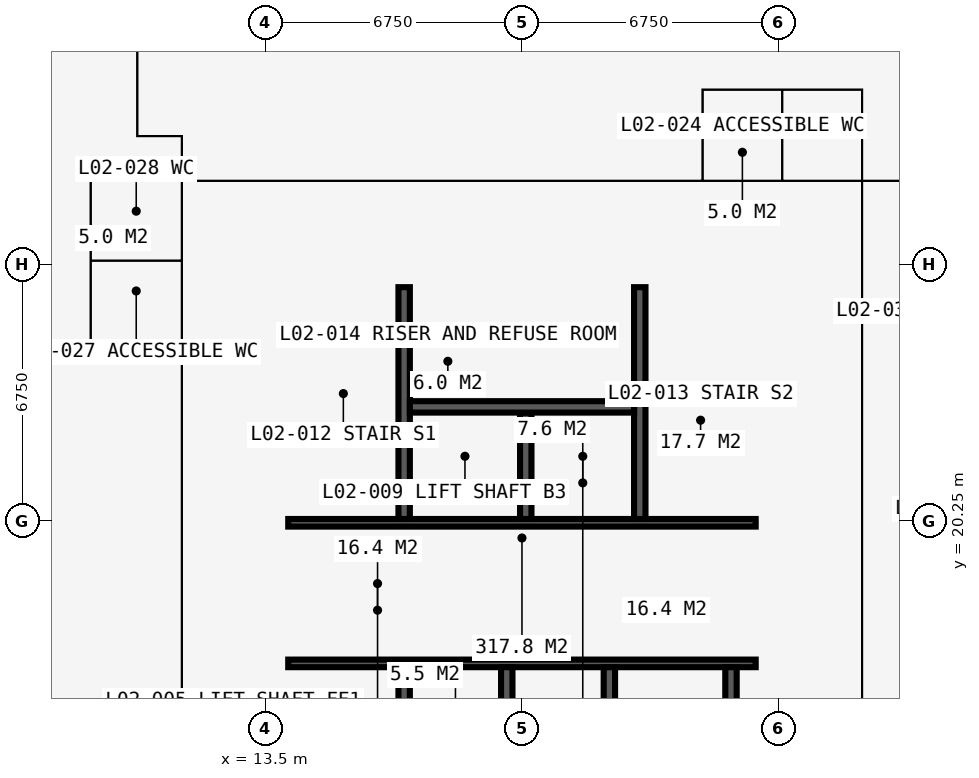
"""IFC4 building model, lengths in metres.
Left out: names, types, materials, properties, quantities, classifications, styles, units other than length and angle.
Written with IfcOpenShell. Run it as: python <this file> out.ifc"""

import sys

from ifc_helpers import new_model, si_unit, direction, frame, frame_2d, origin, place, context, subcontext, project, spatial, rectangle, extrude, element, fill, save


model = new_model("IFC4")
c1 = context("Model", 3, precision=1e-05, world=origin(), true_north=direction((0.0, 1.0)))
c2 = subcontext(c1, "Body", "Model", "MODEL_VIEW")
j1 = project(units=[si_unit("LENGTHUNIT", "METRE"), si_unit("PLANEANGLEUNIT", "RADIAN")], contexts=[c1])
p1 = place(None, origin())
s1 = spatial("IfcSite", under=j1, at=p1, CompositionType="ELEMENT")
p2 = place(p1, origin())
s2 = spatial("IfcBuilding", under=s1, at=p2, CompositionType="ELEMENT")
p3 = place(p2, frame((0.0, 0.0, 9.0)))
s3 = spatial("IfcBuildingStorey", under=s2, at=p3, CompositionType="ELEMENT", Elevation=9.0)
p4 = place(p3, frame((27.0, 14.1, 0.0), z_axis=(0.0, 0.0, 1.0), x_axis=(0.0, 1.0, 0.0)))
e1 = element("IfcWall", 1, at=p4, inside=s3, PredefinedType="SHEAR", context=c2, shape_type="SweptSolid", body=[
    extrude(rectangle(XDim=12.3, YDim=1.2, at=frame_2d((6.15, 0.0))), origin(), (0.0, 0.0, 1.0), 4.5),
])
p5 = place(p4, frame((3.65, 0.0, 0.0)))
e2 = element("IfcOpeningElement", 2, at=p5, cuts=e1, PredefinedType="OPENING", context=c2, shape_type="SweptSolid", body=[
    extrude(rectangle(XDim=1.2, YDim=2.2, at=frame_2d((0.6, 1.1))), frame((0.0, 0.61, 0.0), z_axis=(0.0, -1.0, 0.0), x_axis=(1.0, 0.0, 0.0)), (0.0, 0.0, 1.0), 1.22),
])
p6 = place(p3, frame((27.6, 27.0, 0.0), z_axis=(0.0, 0.0, 1.0), x_axis=(-1.0, 0.0, 0.0)))
e3 = element("IfcWall", 3, at=p6, inside=s3, PredefinedType="SHEAR", context=c2, shape_type="SweptSolid", body=[
    extrude(rectangle(XDim=14.7, YDim=1.2, at=frame_2d((7.35, 0.0))), origin(), (0.0, 0.0, 1.0), 4.5),
])
p7 = place(p6, frame((5.225, 0.0, 0.0)))
e4 = element("IfcOpeningElement", 4, at=p7, cuts=e3, PredefinedType="OPENING", context=c2, shape_type="SweptSolid", body=[
    extrude(rectangle(XDim=0.9, YDim=2.2, at=frame_2d((0.45, 1.1))), frame((0.0, 0.61, 0.0), z_axis=(0.0, -1.0, 0.0), x_axis=(1.0, 0.0, 0.0)), (0.0, 0.0, 1.0), 1.22),
])
p8 = place(p6, frame((8.2, 0.0, 0.0)))
e5 = element("IfcOpeningElement", 5, at=p8, cuts=e3, PredefinedType="OPENING", context=c2, shape_type="SweptSolid", body=[
    extrude(rectangle(XDim=1.0, YDim=2.2, at=frame_2d((0.5, 1.1))), frame((0.0, 0.61, 0.0), z_axis=(0.0, -1.0, 0.0), x_axis=(1.0, 0.0, 0.0)), (0.0, 0.0, 1.0), 1.22),
])
p9 = place(p3, frame((13.5, 26.4, 0.0), z_axis=(0.0, 0.0, 1.0), x_axis=(0.0, -1.0, 0.0)))
e6 = element("IfcWall", 6, at=p9, inside=s3, PredefinedType="SHEAR", context=c2, shape_type="SweptSolid", body=[
    extrude(rectangle(XDim=12.3, YDim=1.2, at=frame_2d((6.15, 0.0))), origin(), (0.0, 0.0, 1.0), 4.5),
])
p10 = place(p9, frame((7.45, 0.0, 0.0)))
e7 = element("IfcOpeningElement", 7, at=p10, cuts=e6, PredefinedType="OPENING", context=c2, shape_type="SweptSolid", body=[
    extrude(rectangle(XDim=1.2, YDim=2.2, at=frame_2d((0.6, 1.1))), frame((0.0, 0.61, 0.0), z_axis=(0.0, -1.0, 0.0), x_axis=(1.0, 0.0, 0.0)), (0.0, 0.0, 1.0), 1.22),
])
p11 = place(p3, frame((14.1, 16.5, 0.0), z_axis=(0.0, 0.0, 1.0), x_axis=(1.0, 0.0, 0.0)))
e8 = element("IfcWall", 8, at=p11, inside=s3, PredefinedType="SHEAR", context=c2, shape_type="SweptSolid", body=[
    extrude(rectangle(XDim=12.3, YDim=0.2, at=frame_2d((6.15, 0.0))), origin(), (0.0, 0.0, 1.0), 4.5),
])
p12 = place(p11, frame((0.9, 0.0, 0.0)))
e9 = element("IfcOpeningElement", 9, at=p12, cuts=e8, PredefinedType="OPENING", context=c2, shape_type="SweptSolid", body=[
    extrude(rectangle(XDim=1.1, YDim=2.2, at=frame_2d((0.55, 1.1))), frame((0.0, 0.11, 0.0), z_axis=(0.0, -1.0, 0.0), x_axis=(1.0, 0.0, 0.0)), (0.0, 0.0, 1.0), 0.22),
])
p13 = place(p11, frame((9.5, 0.0, 0.0)))
e10 = element("IfcOpeningElement", 10, at=p13, cuts=e8, PredefinedType="OPENING", context=c2, shape_type="SweptSolid", body=[
    extrude(rectangle(XDim=1.1, YDim=2.2, at=frame_2d((0.55, 1.1))), frame((0.0, 0.11, 0.0), z_axis=(0.0, -1.0, 0.0), x_axis=(1.0, 0.0, 0.0)), (0.0, 0.0, 1.0), 0.22),
])
p14 = place(p3, frame((14.1, 20.2, 0.0), z_axis=(0.0, 0.0, 1.0), x_axis=(1.0, 0.0, 0.0)))
e11 = element("IfcWall", 11, at=p14, inside=s3, PredefinedType="SHEAR", context=c2, shape_type="SweptSolid", body=[
    extrude(rectangle(XDim=12.3, YDim=0.2, at=frame_2d((6.15, 0.0))), origin(), (0.0, 0.0, 1.0), 4.5),
])
p15 = place(p14, frame((0.35, 0.0, 0.0)))
e12 = element("IfcOpeningElement", 12, at=p15, cuts=e11, PredefinedType="OPENING", context=c2, shape_type="SweptSolid", body=[
    extrude(rectangle(XDim=1.1, YDim=2.2, at=frame_2d((0.55, 1.1))), frame((0.0, 0.11, 0.0), z_axis=(0.0, -1.0, 0.0), x_axis=(1.0, 0.0, 0.0)), (0.0, 0.0, 1.0), 0.22),
])
p16 = place(p14, frame((9.75, 0.0, 0.0)))
e13 = element("IfcOpeningElement", 13, at=p16, cuts=e11, PredefinedType="OPENING", context=c2, shape_type="SweptSolid", body=[
    extrude(rectangle(XDim=1.1, YDim=2.2, at=frame_2d((0.55, 1.1))), frame((0.0, 0.11, 0.0), z_axis=(0.0, -1.0, 0.0), x_axis=(1.0, 0.0, 0.0)), (0.0, 0.0, 1.0), 0.22),
])
for number, where, z_axis, x_axis in (
    (14, (17.15, 20.3, 0.0), (0.0, 0.0, 1.0), (0.0, 1.0, 0.0)),
    (15, (23.35, 20.3, 0.0), (0.0, 0.0, 1.0), (0.0, 1.0, 0.0)),
):
    element("IfcWall", number, at=place(p3, frame(where, z_axis=z_axis, x_axis=x_axis)), inside=s3, PredefinedType="SHEAR", context=c2, shape_type="SweptSolid", body=[
        extrude(rectangle(XDim=6.1, YDim=0.3, at=frame_2d((3.05, 0.0))), origin(), (0.0, 0.0, 1.0), 4.5),
    ])
p17 = place(p3, frame((20.35, 20.3, 0.0), z_axis=(0.0, 0.0, 1.0), x_axis=(0.0, 1.0, 0.0)))
e16 = element("IfcWall", 16, at=p17, inside=s3, PredefinedType="SHEAR", context=c2, shape_type="SweptSolid", body=[
    extrude(rectangle(XDim=2.8, YDim=0.3, at=frame_2d((1.4, 0.0))), origin(), (0.0, 0.0, 1.0), 4.5),
])
p18 = place(p3, frame((17.3, 23.25, 0.0), z_axis=(0.0, 0.0, 1.0), x_axis=(1.0, 0.0, 0.0)))
e17 = element("IfcWall", 17, at=p18, inside=s3, PredefinedType="SHEAR", context=c2, shape_type="SweptSolid", body=[
    extrude(rectangle(XDim=5.9, YDim=0.3, at=frame_2d((2.95, 0.0))), origin(), (0.0, 0.0, 1.0), 4.5),
])
for number, where, z_axis, x_axis in (
    (18, (17.15, 14.1, 0.0), (0.0, 0.0, 1.0), (0.0, 1.0, 0.0)),
    (19, (19.85, 14.1, 0.0), (0.0, 0.0, 1.0), (0.0, 1.0, 0.0)),
    (20, (22.55, 14.1, 0.0), (0.0, 0.0, 1.0), (0.0, 1.0, 0.0)),
    (21, (25.75, 14.1, 0.0), (0.0, 0.0, 1.0), (0.0, 1.0, 0.0)),
):
    element("IfcWall", number, at=place(p3, frame(where, z_axis=z_axis, x_axis=x_axis)), inside=s3, PredefinedType="SHEAR", context=c2, shape_type="SweptSolid", body=[
        extrude(rectangle(XDim=2.3, YDim=0.3, at=frame_2d((1.15, 0.0))), origin(), (0.0, 0.0, 1.0), 4.5),
    ])
p19 = place(p3, frame((18.875, 16.6, 0.0), z_axis=(0.0, 0.0, 1.0), x_axis=(0.0, 1.0, 0.0)))
e22 = element("IfcWall", 22, at=p19, inside=s3, PredefinedType="PARTITIONING", context=c2, shape_type="SweptSolid", body=[
    extrude(rectangle(XDim=3.5, YDim=0.15, at=frame_2d((1.75, 0.0))), origin(), (0.0, 0.0, 1.0), 4.25),
])
p20 = place(p19, frame((1.15, 0.0, 0.0)))
e23 = element("IfcOpeningElement", 23, at=p20, cuts=e22, PredefinedType="OPENING", context=c2, shape_type="SweptSolid", body=[
    extrude(rectangle(XDim=1.2, YDim=2.2, at=frame_2d((0.6, 1.1))), frame((0.0, 0.085, 0.0), z_axis=(0.0, -1.0, 0.0), x_axis=(1.0, 0.0, 0.0)), (0.0, 0.0, 1.0), 0.17),
])
p21 = place(p3, frame((21.625, 16.6, 0.0), z_axis=(0.0, 0.0, 1.0), x_axis=(0.0, 1.0, 0.0)))
e24 = element("IfcWall", 24, at=p21, inside=s3, PredefinedType="PARTITIONING", context=c2, shape_type="SweptSolid", body=[
    extrude(rectangle(XDim=3.5, YDim=0.15, at=frame_2d((1.75, 0.0))), origin(), (0.0, 0.0, 1.0), 4.25),
])
p22 = place(p21, frame((1.15, 0.0, 0.0)))
e25 = element("IfcOpeningElement", 25, at=p22, cuts=e24, PredefinedType="OPENING", context=c2, shape_type="SweptSolid", body=[
    extrude(rectangle(XDim=1.2, YDim=2.2, at=frame_2d((0.6, 1.1))), frame((0.0, 0.085, 0.0), z_axis=(0.0, -1.0, 0.0), x_axis=(1.0, 0.0, 0.0)), (0.0, 0.0, 1.0), 0.17),
])
p23 = place(p3, frame((20.38, 16.6, 0.0), z_axis=(0.0, 0.0, 1.0), x_axis=(0.0, 1.0, 0.0)))
e26 = element("IfcWall", 26, at=p23, inside=s3, PredefinedType="PARTITIONING", context=c2, shape_type="SweptSolid", body=[
    extrude(rectangle(XDim=3.5, YDim=0.15, at=frame_2d((1.75, 0.0))), origin(), (0.0, 0.0, 1.0), 4.25),
])
p24 = place(p3, frame((19.375, 23.4, 0.0), z_axis=(0.0, 0.0, 1.0), x_axis=(0.0, 1.0, 0.0)))
e27 = element("IfcWall", 27, at=p24, inside=s3, PredefinedType="PARTITIONING", context=c2, shape_type="SweptSolid", body=[
    extrude(rectangle(XDim=3.0, YDim=0.15, at=frame_2d((1.5, 0.0))), origin(), (0.0, 0.0, 1.0), 4.25),
])
p25 = place(p3, frame((8.9, 25.0, 0.0), z_axis=(0.0, 0.0, 1.0), x_axis=(0.0, 1.0, 0.0)))
e28 = element("IfcWall", 28, at=p25, inside=s3, PredefinedType="PARTITIONING", context=c2, shape_type="SweptSolid", body=[
    extrude(rectangle(XDim=4.2, YDim=0.15, at=frame_2d((2.1, 0.0))), origin(), (0.0, 0.0, 1.0), 4.25),
])
p26 = place(p3, frame((8.9, 25.0, 0.0), z_axis=(0.0, 0.0, 1.0), x_axis=(1.0, 0.0, 0.0)))
e29 = element("IfcWall", 29, at=p26, inside=s3, PredefinedType="PARTITIONING", context=c2, shape_type="SweptSolid", body=[
    extrude(rectangle(XDim=2.4, YDim=0.1, at=frame_2d((1.2, 0.0))), origin(), (0.0, 0.0, 1.0), 4.25),
])
p27 = place(p3, frame((8.9, 27.1, 0.0), z_axis=(0.0, 0.0, 1.0), x_axis=(1.0, 0.0, 0.0)))
e30 = element("IfcWall", 30, at=p27, inside=s3, PredefinedType="PARTITIONING", context=c2, shape_type="SweptSolid", body=[
    extrude(rectangle(XDim=2.4, YDim=0.1, at=frame_2d((1.2, 0.0))), origin(), (0.0, 0.0, 1.0), 3.752),
])
p28 = place(p3, frame((8.9, 29.2, 0.0), z_axis=(0.0, 0.0, 1.0), x_axis=(1.0, 0.0, 0.0)))
e31 = element("IfcWall", 31, at=p28, inside=s3, PredefinedType="PARTITIONING", context=c2, shape_type="SweptSolid", body=[
    extrude(rectangle(XDim=21.475, YDim=0.15, at=frame_2d((10.738, 0.0))), origin(), (0.0, 0.0, 1.0), 4.25),
])
p29 = place(p28, frame((16.65, 0.0, 0.0)))
e32 = element("IfcOpeningElement", 32, at=p29, cuts=e31, PredefinedType="OPENING", context=c2, shape_type="SweptSolid", body=[
    extrude(rectangle(XDim=1.0, YDim=2.2, at=frame_2d((0.5, 1.1))), frame((0.0, 0.085, 0.0), z_axis=(0.0, -1.0, 0.0), x_axis=(1.0, 0.0, 0.0)), (0.0, 0.0, 1.0), 0.17),
])
p30 = place(p28, frame((18.75, 0.0, 0.0)))
e33 = element("IfcOpeningElement", 33, at=p30, cuts=e31, PredefinedType="OPENING", context=c2, shape_type="SweptSolid", body=[
    extrude(rectangle(XDim=1.0, YDim=2.2, at=frame_2d((0.5, 1.1))), frame((0.0, 0.085, 0.0), z_axis=(0.0, -1.0, 0.0), x_axis=(1.0, 0.0, 0.0)), (0.0, 0.0, 1.0), 0.17),
])
p31 = place(p28, frame((8.45, 0.0, 0.0)))
e34 = element("IfcOpeningElement", 34, at=p31, cuts=e31, PredefinedType="OPENING", context=c2, shape_type="SweptSolid", body=[
    extrude(rectangle(XDim=1.6, YDim=2.4, at=frame_2d((0.8, 1.2))), frame((0.0, 0.085, 0.0), z_axis=(0.0, -1.0, 0.0), x_axis=(1.0, 0.0, 0.0)), (0.0, 0.0, 1.0), 0.17),
])
p32 = place(p3, frame((10.125, 30.375, 0.0), z_axis=(0.0, 0.0, 1.0), x_axis=(0.0, 1.0, 0.0)))
e35 = element("IfcWall", 35, at=p32, inside=s3, PredefinedType="PARTITIONING", context=c2, shape_type="SweptSolid", body=[
    extrude(rectangle(XDim=10.859, YDim=0.15, at=frame_2d((5.429, 0.0))), origin(), (0.0, 0.0, 1.0), 4.25),
])
p33 = place(p3, frame((10.125, 30.375, 0.0), z_axis=(0.0, 0.0, 1.0), x_axis=(1.0, 0.0, 0.0)))
e36 = element("IfcWall", 36, at=p33, inside=s3, PredefinedType="PARTITIONING", context=c2, shape_type="SweptSolid", body=[
    extrude(rectangle(XDim=1.175, YDim=0.15, at=frame_2d((0.587, 0.0))), origin(), (0.0, 0.0, 1.0), 4.25),
])
p34 = place(p3, frame((11.3, 8.9, 0.0), z_axis=(0.0, 0.0, 1.0), x_axis=(0.0, 1.0, 0.0)))
e37 = element("IfcWall", 37, at=p34, inside=s3, PredefinedType="PARTITIONING", context=c2, shape_type="SweptSolid", body=[
    extrude(rectangle(XDim=21.475, YDim=0.15, at=frame_2d((10.738, 0.0))), origin(), (0.0, 0.0, 1.0), 4.25),
])
p35 = place(p34, frame((16.65, 0.0, 0.0)))
e38 = element("IfcOpeningElement", 38, at=p35, cuts=e37, PredefinedType="OPENING", context=c2, shape_type="SweptSolid", body=[
    extrude(rectangle(XDim=1.0, YDim=2.2, at=frame_2d((0.5, 1.1))), frame((0.0, 0.085, 0.0), z_axis=(0.0, -1.0, 0.0), x_axis=(1.0, 0.0, 0.0)), (0.0, 0.0, 1.0), 0.17),
])
p36 = place(p34, frame((18.75, 0.0, 0.0)))
e39 = element("IfcOpeningElement", 39, at=p36, cuts=e37, PredefinedType="OPENING", context=c2, shape_type="SweptSolid", body=[
    extrude(rectangle(XDim=1.0, YDim=2.2, at=frame_2d((0.5, 1.1))), frame((0.0, 0.085, 0.0), z_axis=(0.0, -1.0, 0.0), x_axis=(1.0, 0.0, 0.0)), (0.0, 0.0, 1.0), 0.17),
])
p37 = place(p34, frame((8.45, 0.0, 0.0)))
e40 = element("IfcOpeningElement", 40, at=p37, cuts=e37, PredefinedType="OPENING", context=c2, shape_type="SweptSolid", body=[
    extrude(rectangle(XDim=1.6, YDim=2.4, at=frame_2d((0.8, 1.2))), frame((0.0, 0.085, 0.0), z_axis=(0.0, -1.0, 0.0), x_axis=(1.0, 0.0, 0.0)), (0.0, 0.0, 1.0), 0.17),
])
p38 = place(p3, frame((25.0, 29.2, 0.0), z_axis=(0.0, 0.0, 1.0), x_axis=(0.0, 1.0, 0.0)))
e41 = element("IfcWall", 41, at=p38, inside=s3, PredefinedType="PARTITIONING", context=c2, shape_type="SweptSolid", body=[
    extrude(rectangle(XDim=2.4, YDim=0.1, at=frame_2d((1.2, 0.0))), origin(), (0.0, 0.0, 1.0), 4.25),
])
p39 = place(p3, frame((25.0, 31.6, 0.0), z_axis=(0.0, 0.0, 1.0), x_axis=(1.0, 0.0, 0.0)))
e42 = element("IfcWall", 42, at=p39, inside=s3, PredefinedType="PARTITIONING", context=c2, shape_type="SweptSolid", body=[
    extrude(rectangle(XDim=4.2, YDim=0.15, at=frame_2d((2.1, 0.0))), origin(), (0.0, 0.0, 1.0), 4.25),
])
p40 = place(p3, frame((27.1, 29.2, 0.0), z_axis=(0.0, 0.0, 1.0), x_axis=(0.0, 1.0, 0.0)))
e43 = element("IfcWall", 43, at=p40, inside=s3, PredefinedType="PARTITIONING", context=c2, shape_type="SweptSolid", body=[
    extrude(rectangle(XDim=2.4, YDim=0.1, at=frame_2d((1.2, 0.0))), origin(), (0.0, 0.0, 1.0), 3.752),
])
p41 = place(p3, frame((29.2, 11.3, 0.0), z_axis=(0.0, 0.0, 1.0), x_axis=(0.0, 1.0, 0.0)))
e44 = element("IfcWall", 44, at=p41, inside=s3, PredefinedType="PARTITIONING", context=c2, shape_type="SweptSolid", body=[
    extrude(rectangle(XDim=20.3, YDim=0.15, at=frame_2d((10.15, 0.0))), origin(), (0.0, 0.0, 1.0), 4.25),
])
p42 = place(p41, frame((15.35, 0.0, 0.0)))
e45 = element("IfcOpeningElement", 45, at=p42, cuts=e44, PredefinedType="OPENING", context=c2, shape_type="SweptSolid", body=[
    extrude(rectangle(XDim=1.6, YDim=2.4, at=frame_2d((0.8, 1.2))), frame((0.0, 0.085, 0.0), z_axis=(0.0, -1.0, 0.0), x_axis=(1.0, 0.0, 0.0)), (0.0, 0.0, 1.0), 0.17),
])
p43 = place(p41, frame((8.35, 0.0, 0.0)))
e46 = element("IfcOpeningElement", 46, at=p43, cuts=e44, PredefinedType="OPENING", context=c2, shape_type="SweptSolid", body=[
    extrude(rectangle(XDim=1.2, YDim=2.2, at=frame_2d((0.6, 1.1))), frame((0.0, 0.085, 0.0), z_axis=(0.0, -1.0, 0.0), x_axis=(1.0, 0.0, 0.0)), (0.0, 0.0, 1.0), 0.17),
])
p44 = place(p3, frame((29.2, 25.7, 0.0), z_axis=(0.0, 0.0, 1.0), x_axis=(1.0, 0.0, 0.0)))
e47 = element("IfcWall", 47, at=p44, inside=s3, PredefinedType="SHEAR", context=c2, shape_type="SweptSolid", body=[
    extrude(rectangle(XDim=3.45, YDim=0.1, at=frame_2d((1.725, 0.0))), origin(), (0.0, 0.0, 1.0), 4.25),
])
p45 = place(p12, origin())
e48 = element("IfcDoor", 48, at=p45, inside=s3, OperationType="DOUBLE_DOOR_SLIDING", PredefinedType="DOOR", context=c2, shape_type="SweptSolid", body=[
    extrude(rectangle(XDim=1.1, YDim=2.2, at=frame_2d((0.55, 1.1))), frame((0.0, 0.025, 0.0), z_axis=(0.0, -1.0, 0.0), x_axis=(1.0, 0.0, 0.0)), (0.0, 0.0, 1.0), 0.05),
])
fill(e9, e48)
p46 = place(p13, origin())
e49 = element("IfcDoor", 49, at=p46, inside=s3, OperationType="DOUBLE_DOOR_SLIDING", PredefinedType="DOOR", context=c2, shape_type="SweptSolid", body=[
    extrude(rectangle(XDim=1.1, YDim=2.2, at=frame_2d((0.55, 1.1))), frame((0.0, 0.025, 0.0), z_axis=(0.0, -1.0, 0.0), x_axis=(1.0, 0.0, 0.0)), (0.0, 0.0, 1.0), 0.05),
])
fill(e10, e49)
p47 = place(p10, origin())
e50 = element("IfcDoor", 50, at=p47, inside=s3, OperationType="DOUBLE_DOOR_SINGLE_SWING", PredefinedType="DOOR", context=c2, shape_type="SweptSolid", body=[
    extrude(rectangle(XDim=1.2, YDim=2.2, at=frame_2d((0.6, 1.1))), frame((0.0, 0.025, 0.0), z_axis=(0.0, -1.0, 0.0), x_axis=(1.0, 0.0, 0.0)), (0.0, 0.0, 1.0), 0.05),
])
fill(e7, e50)
p48 = place(p5, origin())
e51 = element("IfcDoor", 51, at=p48, inside=s3, OperationType="DOUBLE_DOOR_SINGLE_SWING", PredefinedType="DOOR", context=c2, shape_type="SweptSolid", body=[
    extrude(rectangle(XDim=1.2, YDim=2.2, at=frame_2d((0.6, 1.1))), frame((0.0, 0.025, 0.0), z_axis=(0.0, -1.0, 0.0), x_axis=(1.0, 0.0, 0.0)), (0.0, 0.0, 1.0), 0.05),
])
fill(e2, e51)
p49 = place(p20, origin())
e52 = element("IfcDoor", 52, at=p49, inside=s3, OperationType="DOUBLE_DOOR_SINGLE_SWING", PredefinedType="DOOR", context=c2, shape_type="SweptSolid", body=[
    extrude(rectangle(XDim=1.2, YDim=2.2, at=frame_2d((0.6, 1.1))), frame((0.0, 0.025, 0.0), z_axis=(0.0, -1.0, 0.0), x_axis=(1.0, 0.0, 0.0)), (0.0, 0.0, 1.0), 0.05),
])
fill(e23, e52)
p50 = place(p22, origin())
e53 = element("IfcDoor", 53, at=p50, inside=s3, OperationType="DOUBLE_DOOR_SINGLE_SWING", PredefinedType="DOOR", context=c2, shape_type="SweptSolid", body=[
    extrude(rectangle(XDim=1.2, YDim=2.2, at=frame_2d((0.6, 1.1))), frame((0.0, 0.025, 0.0), z_axis=(0.0, -1.0, 0.0), x_axis=(1.0, 0.0, 0.0)), (0.0, 0.0, 1.0), 0.05),
])
fill(e25, e53)
p51 = place(p7, origin())
e54 = element("IfcDoor", 54, at=p51, inside=s3, OperationType="SINGLE_SWING_LEFT", PredefinedType="DOOR", context=c2, shape_type="SweptSolid", body=[
    extrude(rectangle(XDim=0.9, YDim=2.2, at=frame_2d((0.45, 1.1))), frame((0.0, 0.4, 0.0), z_axis=(0.0, -1.0, 0.0), x_axis=(1.0, 0.0, 0.0)), (0.0, 0.0, 1.0), 0.8),
])
fill(e4, e54)
p52 = place(p8, origin())
e55 = element("IfcDoor", 55, at=p52, inside=s3, OperationType="SINGLE_SWING_LEFT", PredefinedType="DOOR", context=c2, shape_type="SweptSolid", body=[
    extrude(rectangle(XDim=1.0, YDim=2.2, at=frame_2d((0.5, 1.1))), frame((0.0, 0.025, 0.0), z_axis=(0.0, -1.0, 0.0), x_axis=(1.0, 0.0, 0.0)), (0.0, 0.0, 1.0), 0.05),
])
fill(e5, e55)
p53 = place(p15, origin())
e56 = element("IfcDoor", 56, at=p53, inside=s3, OperationType="SINGLE_SWING_LEFT", PredefinedType="DOOR", context=c2, shape_type="SweptSolid", body=[
    extrude(rectangle(XDim=1.1, YDim=2.2, at=frame_2d((0.55, 1.1))), frame((0.0, 0.025, 0.0), z_axis=(0.0, -1.0, 0.0), x_axis=(1.0, 0.0, 0.0)), (0.0, 0.0, 1.0), 0.05),
])
fill(e12, e56)
p54 = place(p16, origin())
e57 = element("IfcDoor", 57, at=p54, inside=s3, OperationType="SINGLE_SWING_LEFT", PredefinedType="DOOR", context=c2, shape_type="SweptSolid", body=[
    extrude(rectangle(XDim=1.1, YDim=2.2, at=frame_2d((0.55, 1.1))), frame((0.0, 0.025, 0.0), z_axis=(0.0, -1.0, 0.0), x_axis=(1.0, 0.0, 0.0)), (0.0, 0.0, 1.0), 0.05),
])
fill(e13, e57)
p55 = place(p42, origin())
e58 = element("IfcDoor", 58, at=p55, inside=s3, OperationType="DOUBLE_DOOR_SINGLE_SWING", PredefinedType="DOOR", context=c2, shape_type="SweptSolid", body=[
    extrude(rectangle(XDim=1.6, YDim=2.4, at=frame_2d((0.8, 1.2))), frame((0.0, 0.025, 0.0), z_axis=(0.0, -1.0, 0.0), x_axis=(1.0, 0.0, 0.0)), (0.0, 0.0, 1.0), 0.05),
])
fill(e45, e58)
p56 = place(p29, origin())
e59 = element("IfcDoor", 59, at=p56, inside=s3, OperationType="SINGLE_SWING_LEFT", PredefinedType="DOOR", context=c2, shape_type="SweptSolid", body=[
    extrude(rectangle(XDim=1.0, YDim=2.2, at=frame_2d((0.5, 1.1))), frame((0.0, 0.025, 0.0), z_axis=(0.0, -1.0, 0.0), x_axis=(1.0, 0.0, 0.0)), (0.0, 0.0, 1.0), 0.05),
])
fill(e32, e59)
p57 = place(p30, origin())
e60 = element("IfcDoor", 60, at=p57, inside=s3, OperationType="SINGLE_SWING_LEFT", PredefinedType="DOOR", context=c2, shape_type="SweptSolid", body=[
    extrude(rectangle(XDim=1.0, YDim=2.2, at=frame_2d((0.5, 1.1))), frame((0.0, 0.025, 0.0), z_axis=(0.0, -1.0, 0.0), x_axis=(1.0, 0.0, 0.0)), (0.0, 0.0, 1.0), 0.05),
])
fill(e33, e60)
p58 = place(p31, origin())
e61 = element("IfcDoor", 61, at=p58, inside=s3, OperationType="DOUBLE_DOOR_SINGLE_SWING", PredefinedType="DOOR", context=c2, shape_type="SweptSolid", body=[
    extrude(rectangle(XDim=1.6, YDim=2.4, at=frame_2d((0.8, 1.2))), frame((0.0, 0.025, 0.0), z_axis=(0.0, -1.0, 0.0), x_axis=(1.0, 0.0, 0.0)), (0.0, 0.0, 1.0), 0.05),
])
fill(e34, e61)
p59 = place(p35, origin())
e62 = element("IfcDoor", 62, at=p59, inside=s3, OperationType="SINGLE_SWING_LEFT", PredefinedType="DOOR", context=c2, shape_type="SweptSolid", body=[
    extrude(rectangle(XDim=1.0, YDim=2.2, at=frame_2d((0.5, 1.1))), frame((0.0, 0.025, 0.0), z_axis=(0.0, -1.0, 0.0), x_axis=(1.0, 0.0, 0.0)), (0.0, 0.0, 1.0), 0.05),
])
fill(e38, e62)
p60 = place(p36, origin())
e63 = element("IfcDoor", 63, at=p60, inside=s3, OperationType="SINGLE_SWING_LEFT", PredefinedType="DOOR", context=c2, shape_type="SweptSolid", body=[
    extrude(rectangle(XDim=1.0, YDim=2.2, at=frame_2d((0.5, 1.1))), frame((0.0, 0.025, 0.0), z_axis=(0.0, -1.0, 0.0), x_axis=(1.0, 0.0, 0.0)), (0.0, 0.0, 1.0), 0.05),
])
fill(e39, e63)
p61 = place(p37, origin())
e64 = element("IfcDoor", 64, at=p61, inside=s3, OperationType="DOUBLE_DOOR_SINGLE_SWING", PredefinedType="DOOR", context=c2, shape_type="SweptSolid", body=[
    extrude(rectangle(XDim=1.6, YDim=2.4, at=frame_2d((0.8, 1.2))), frame((0.0, 0.025, 0.0), z_axis=(0.0, -1.0, 0.0), x_axis=(1.0, 0.0, 0.0)), (0.0, 0.0, 1.0), 0.05),
])
fill(e40, e64)
p62 = place(p43, origin())
e65 = element("IfcDoor", 65, at=p62, inside=s3, OperationType="DOUBLE_DOOR_SINGLE_SWING", PredefinedType="DOOR", context=c2, shape_type="SweptSolid", body=[
    extrude(rectangle(XDim=1.2, YDim=2.2, at=frame_2d((0.6, 1.1))), frame((0.0, 0.025, 0.0), z_axis=(0.0, -1.0, 0.0), x_axis=(1.0, 0.0, 0.0)), (0.0, 0.0, 1.0), 0.05),
])
fill(e46, e65)
save(model, sys.argv[1])
